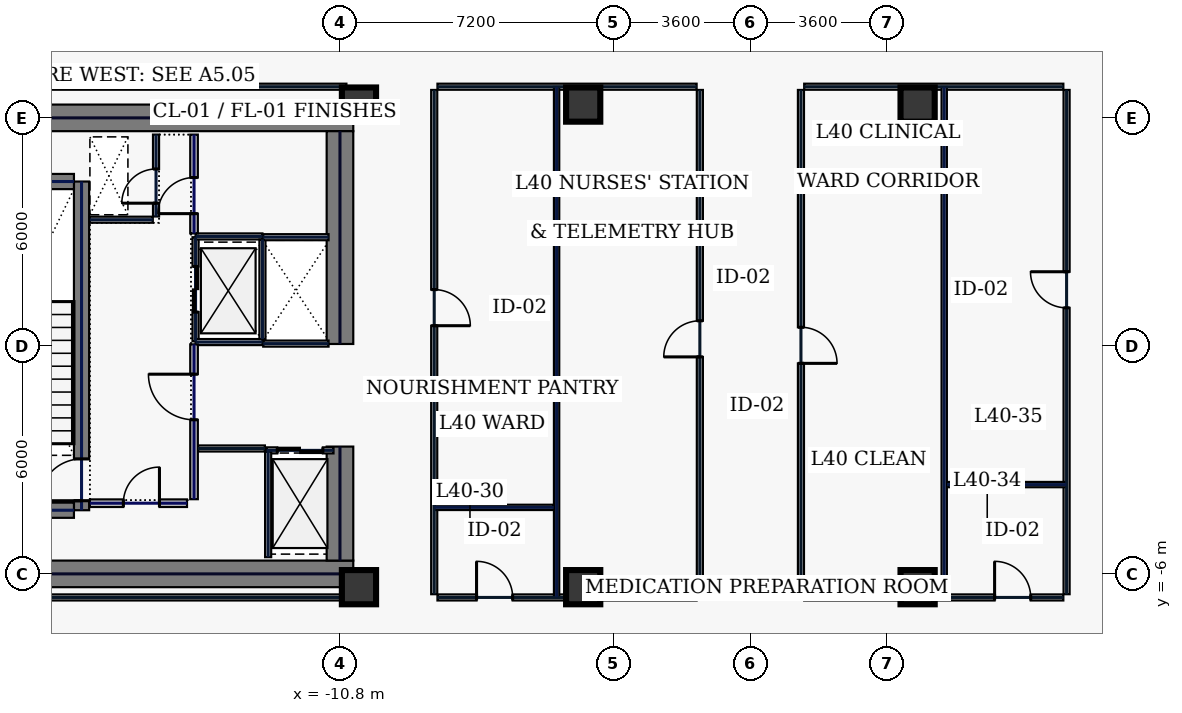
"""IFC4 building model, lengths in metres.
Left out: names, types, materials, properties, quantities, classifications, styles, units other than length and angle.
Written with IfcOpenShell. Run it as: python <this file> out.ifc"""

import sys

from ifc_helpers import new_model, si_unit, direction, frame, frame_2d, origin, origin_2d, place, context, subcontext, project, spatial, rectangle, hollow_rectangle, extrude, element, fill, save


model = new_model("IFC4")
c1 = context("Model", 3, precision=1e-05, world=origin(), true_north=direction((0.0, 1.0)))
c2 = subcontext(c1, "Body", "Model", "MODEL_VIEW")
j1 = project(units=[si_unit("LENGTHUNIT", "METRE"), si_unit("PLANEANGLEUNIT", "RADIAN")], contexts=[c1])
p1 = place(None, origin())
s1 = spatial("IfcSite", under=j1, at=p1, CompositionType="ELEMENT")
p2 = place(p1, origin())
s2 = spatial("IfcBuilding", under=s1, at=p2, CompositionType="ELEMENT")
p3 = place(p2, frame((0.0, 0.0, 176.2)))
s3 = spatial("IfcBuildingStorey", under=s2, at=p3, CompositionType="ELEMENT", Elevation=176.2)
for number, where, z_axis, x_axis in (
    (1, (-22.0, 6.0, 0.0), (0.0, 0.0, 1.0), (1.0, 0.0, 0.0)),
    (2, (-22.0, -6.0, 0.0), (0.0, 0.0, 1.0), (1.0, 0.0, 0.0)),
):
    element("IfcWall", number, at=place(p3, frame(where, z_axis=z_axis, x_axis=x_axis)), inside=s3, PredefinedType="SHEAR", context=c2, shape_type="SweptSolid", body=[
        extrude(rectangle(XDim=11.55, YDim=0.7, at=frame_2d((5.775, 0.0))), origin(), (0.0, 0.0, 1.0), 3.74),
    ])
p4 = place(p3, frame((-10.8, -5.65, 0.0), z_axis=(0.0, 0.0, 1.0), x_axis=(0.0, 1.0, 0.0)))
e3 = element("IfcWall", 3, at=p4, inside=s3, PredefinedType="SHEAR", context=c2, shape_type="SweptSolid", body=[
    extrude(rectangle(XDim=3.0, YDim=0.7, at=frame_2d((1.5, 0.0))), origin(), (0.0, 0.0, 1.0), 3.74),
])
p5 = place(p3, frame((-10.8, 0.05, 0.0), z_axis=(0.0, 0.0, 1.0), x_axis=(0.0, 1.0, 0.0)))
e4 = element("IfcWall", 4, at=p5, inside=s3, PredefinedType="SHEAR", context=c2, shape_type="SweptSolid", body=[
    extrude(rectangle(XDim=5.6, YDim=0.7, at=frame_2d((2.8, 0.0))), origin(), (0.0, 0.0, 1.0), 3.74),
])
p6 = place(p3, frame((-17.6, -4.325, 0.0), z_axis=(0.0, 0.0, 1.0), x_axis=(0.0, 1.0, 0.0)))
e5 = element("IfcWall", 5, at=p6, inside=s3, PredefinedType="SHEAR", context=c2, shape_type="SweptSolid", body=[
    extrude(rectangle(XDim=8.65, YDim=0.4, at=frame_2d((4.325, 0.0))), origin(), (0.0, 0.0, 1.0), 3.74),
])
p7 = place(p6, frame((0.25, 0.0, 0.0)))
e6 = element("IfcOpeningElement", 6, at=p7, cuts=e5, PredefinedType="OPENING", context=c2, shape_type="SweptSolid", body=[
    extrude(rectangle(XDim=1.1, YDim=2.2, at=frame_2d((0.55, 1.1))), frame((0.0, 0.21, 0.0), z_axis=(0.0, -1.0, 0.0), x_axis=(1.0, 0.0, 0.0)), (0.0, 0.0, 1.0), 0.42),
])
for number, where, z_axis, x_axis in (
    (7, (-21.2, -4.325, 0.0), (0.0, 0.0, 1.0), (1.0, 0.0, 0.0)),
    (8, (-21.2, 4.325, 0.0), (0.0, 0.0, 1.0), (1.0, 0.0, 0.0)),
):
    element("IfcWall", number, at=place(p3, frame(where, z_axis=z_axis, x_axis=x_axis)), inside=s3, PredefinedType="SHEAR", context=c2, shape_type="SweptSolid", body=[
        extrude(rectangle(XDim=3.4, YDim=0.4, at=frame_2d((1.7, 0.0))), origin(), (0.0, 0.0, 1.0), 3.74),
    ])
for number, where, z_axis, x_axis in (
    (9, (-10.3, -6.35, 0.0), (0.0, 0.0, 1.0), (1.0, 0.0, 0.0)),
    (10, (-10.3, 6.35, 0.0), (0.0, 0.0, 1.0), (1.0, 0.0, 0.0)),
    (11, (-4.4, -6.35, 0.0), (0.0, 0.0, 1.0), (1.0, 0.0, 0.0)),
    (12, (4.4, -6.35, 0.0), (0.0, 0.0, 1.0), (1.0, 0.0, 0.0)),
    (13, (-4.4, 6.35, 0.0), (0.0, 0.0, 1.0), (1.0, 0.0, 0.0)),
    (14, (4.4, 6.35, 0.0), (0.0, 0.0, 1.0), (1.0, 0.0, 0.0)),
):
    element("IfcColumn", number, at=place(p3, frame(where, z_axis=z_axis, x_axis=x_axis)), inside=s3, PredefinedType="COLUMN", context=c2, shape_type="SweptSolid", body=[
        extrude(hollow_rectangle(XDim=0.9, YDim=0.9, WallThickness=0.04, at=origin_2d()), origin(), (0.0, 0.0, 1.0), 3.74),
    ])
p8 = place(p3, frame((-14.6, 0.12, 0.0), z_axis=(0.0, 0.0, 1.0), x_axis=(0.0, 1.0, 0.0)))
e15 = element("IfcWall", 15, at=p8, inside=s3, PredefinedType="PARTITIONING", context=c2, shape_type="SweptSolid", body=[
    extrude(rectangle(XDim=2.74, YDim=0.16, at=frame_2d((1.37, 0.0))), origin(), (0.0, 0.0, 1.0), 3.74),
])
p9 = place(p8, frame((0.77, 0.0, 0.0)))
e16 = element("IfcOpeningElement", 16, at=p9, cuts=e15, PredefinedType="OPENING", context=c2, shape_type="SweptSolid", body=[
    extrude(rectangle(XDim=1.2, YDim=2.2, at=frame_2d((0.6, 1.1))), frame((0.0, 0.09, 0.0), z_axis=(0.0, -1.0, 0.0), x_axis=(1.0, 0.0, 0.0)), (0.0, 0.0, 1.0), 0.18),
])
for number, where, z_axis, x_axis in (
    (17, (-14.6, 0.1, 0.0), (0.0, 0.0, 1.0), (1.0, 0.0, 0.0)),
    (18, (-14.6, 2.88, 0.0), (0.0, 0.0, 1.0), (1.0, 0.0, 0.0)),
):
    element("IfcWall", number, at=place(p3, frame(where, z_axis=z_axis, x_axis=x_axis)), inside=s3, PredefinedType="PARTITIONING", context=c2, shape_type="SweptSolid", body=[
        extrude(rectangle(XDim=1.76, YDim=0.16, at=frame_2d((0.88, 0.0))), origin(), (0.0, 0.0, 1.0), 3.74),
    ])
p10 = place(p3, frame((-12.84, 0.18, 0.0), z_axis=(0.0, 0.0, 1.0), x_axis=(0.0, 1.0, 0.0)))
e19 = element("IfcWall", 19, at=p10, inside=s3, PredefinedType="PARTITIONING", context=c2, shape_type="SweptSolid", body=[
    extrude(rectangle(XDim=2.62, YDim=0.16, at=frame_2d((1.31, 0.0))), origin(), (0.0, 0.0, 1.0), 3.74),
])
p11 = place(p3, frame((-12.73, -2.75, 0.0), z_axis=(0.0, 0.0, 1.0), x_axis=(1.0, 0.0, 0.0)))
e20 = element("IfcWall", 20, at=p11, inside=s3, PredefinedType="PARTITIONING", context=c2, shape_type="SweptSolid", body=[
    extrude(rectangle(XDim=1.76, YDim=0.16, at=frame_2d((0.88, 0.0))), origin(), (0.0, 0.0, 1.0), 3.74),
])
p12 = place(p11, frame((0.28, 0.0, 0.0)))
e21 = element("IfcOpeningElement", 21, at=p12, cuts=e20, PredefinedType="OPENING", context=c2, shape_type="SweptSolid", body=[
    extrude(rectangle(XDim=1.2, YDim=2.2, at=frame_2d((0.6, 1.1))), frame((0.0, 0.09, 0.0), z_axis=(0.0, -1.0, 0.0), x_axis=(1.0, 0.0, 0.0)), (0.0, 0.0, 1.0), 0.18),
])
for number, where, z_axis, x_axis in (
    (22, (-12.82, 0.06, 0.0), (0.0, 0.0, 1.0), (1.0, 0.0, 0.0)),
    (23, (-12.82, 2.86, 0.0), (0.0, 0.0, 1.0), (1.0, 0.0, 0.0)),
):
    element("IfcWall", number, at=place(p3, frame(where, z_axis=z_axis, x_axis=x_axis)), inside=s3, PredefinedType="PARTITIONING", context=c2, shape_type="SweptSolid", body=[
        extrude(rectangle(XDim=1.72, YDim=0.16, at=frame_2d((0.86, 0.0))), origin(), (0.0, 0.0, 1.0), 3.74),
    ])
p13 = place(p3, frame((-15.64, 3.405, 0.0), z_axis=(0.0, 0.0, 1.0), x_axis=(0.0, 1.0, 0.0)))
e24 = element("IfcWall", 24, at=p13, inside=s3, PredefinedType="PARTITIONING", context=c2, shape_type="SweptSolid", body=[
    extrude(rectangle(XDim=2.155, YDim=0.16, at=frame_2d((1.078, 0.0))), origin(), (0.0, 0.0, 1.0), 3.74),
])
p14 = place(p13, frame((0.35, 0.0, 0.0)))
e25 = element("IfcOpeningElement", 25, at=p14, cuts=e24, PredefinedType="OPENING", context=c2, shape_type="SweptSolid", body=[
    extrude(rectangle(XDim=0.9, YDim=2.2, at=frame_2d((0.45, 1.1))), frame((0.0, 0.09, 0.0), z_axis=(0.0, -1.0, 0.0), x_axis=(1.0, 0.0, 0.0)), (0.0, 0.0, 1.0), 0.18),
])
p15 = place(p3, frame((-17.38, 3.32, 0.0), z_axis=(0.0, 0.0, 1.0), x_axis=(1.0, 0.0, 0.0)))
e26 = element("IfcWall", 26, at=p15, inside=s3, PredefinedType="PARTITIONING", context=c2, shape_type="SweptSolid", body=[
    extrude(rectangle(XDim=1.655, YDim=0.16, at=frame_2d((0.827, 0.0))), origin(), (0.0, 0.0, 1.0), 3.74),
])
p16 = place(p3, frame((-17.38, -4.14, 0.0), z_axis=(0.0, 0.0, 1.0), x_axis=(1.0, 0.0, 0.0)))
e27 = element("IfcWall", 27, at=p16, inside=s3, PredefinedType="SOLIDWALL", context=c2, shape_type="SweptSolid", body=[
    extrude(rectangle(XDim=2.555, YDim=0.2, at=frame_2d((1.277, 0.0))), origin(), (0.0, 0.0, 1.0), 3.74),
])
p17 = place(p16, frame((0.88, 0.0, 0.0)))
e28 = element("IfcOpeningElement", 28, at=p17, cuts=e27, PredefinedType="OPENING", context=c2, shape_type="SweptSolid", body=[
    extrude(rectangle(XDim=0.95, YDim=2.2, at=frame_2d((0.475, 1.1))), frame((0.0, 0.11, 0.0), z_axis=(0.0, -1.0, 0.0), x_axis=(1.0, 0.0, 0.0)), (0.0, 0.0, 1.0), 0.22),
])
p18 = place(p3, frame((-14.535, -2.7, 0.0), z_axis=(0.0, 0.0, 1.0), x_axis=(1.0, 0.0, 0.0)))
e29 = element("IfcWall", 29, at=p18, inside=s3, PredefinedType="PARTITIONING", context=c2, shape_type="SweptSolid", body=[
    extrude(rectangle(XDim=1.76, YDim=0.16, at=frame_2d((0.88, 0.0))), origin(), (0.0, 0.0, 1.0), 3.74),
])
p19 = place(p3, frame((-12.69, -5.56, 0.0), z_axis=(0.0, 0.0, 1.0), x_axis=(0.0, 1.0, 0.0)))
e30 = element("IfcWall", 30, at=p19, inside=s3, PredefinedType="PARTITIONING", context=c2, shape_type="SweptSolid", body=[
    extrude(rectangle(XDim=2.775, YDim=0.16, at=frame_2d((1.388, 0.0))), origin(), (0.0, 0.0, 1.0), 3.74),
])
p20 = place(p3, frame((-14.64, 2.96, 0.0), z_axis=(0.0, 0.0, 1.0), x_axis=(0.0, 1.0, 0.0)))
e31 = element("IfcWall", 31, at=p20, inside=s3, PredefinedType="SOLIDWALL", context=c2, shape_type="SweptSolid", body=[
    extrude(rectangle(XDim=2.6, YDim=0.2, at=frame_2d((1.3, 0.0))), origin(), (0.0, 0.0, 1.0), 3.74),
])
p21 = place(p20, frame((0.52, 0.0, 0.0)))
e32 = element("IfcOpeningElement", 32, at=p21, cuts=e31, PredefinedType="OPENING", context=c2, shape_type="SweptSolid", body=[
    extrude(rectangle(XDim=0.95, YDim=2.2, at=frame_2d((0.475, 1.1))), frame((0.0, 0.11, 0.0), z_axis=(0.0, -1.0, 0.0), x_axis=(1.0, 0.0, 0.0)), (0.0, 0.0, 1.0), 0.22),
])
p22 = place(p3, frame((-14.64, -4.035, 0.0), z_axis=(0.0, 0.0, 1.0), x_axis=(0.0, 1.0, 0.0)))
e33 = element("IfcWall", 33, at=p22, inside=s3, PredefinedType="SOLIDWALL", context=c2, shape_type="SweptSolid", body=[
    extrude(rectangle(XDim=4.075, YDim=0.2, at=frame_2d((2.038, 0.0))), origin(), (0.0, 0.0, 1.0), 3.74),
])
p23 = place(p22, frame((2.09, 0.0, 0.0)))
e34 = element("IfcOpeningElement", 34, at=p23, cuts=e33, PredefinedType="OPENING", context=c2, shape_type="SweptSolid", body=[
    extrude(rectangle(XDim=1.2, YDim=2.2, at=frame_2d((0.6, 1.1))), frame((0.0, 0.11, 0.0), z_axis=(0.0, -1.0, 0.0), x_axis=(1.0, 0.0, 0.0)), (0.0, 0.0, 1.0), 0.22),
])
for number, where, z_axis, x_axis in (
    (35, (-24.965, -6.62, 0.0), (0.0, 0.0, 1.0), (1.0, 0.0, 0.0)),
    (36, (-10.63, 6.82, 0.0), (0.0, 0.0, 1.0), (-1.0, 0.0, 0.0)),
):
    element("IfcWall", number, at=place(p3, frame(where, z_axis=z_axis, x_axis=x_axis)), inside=s3, PredefinedType="PARTITIONING", context=c2, shape_type="SweptSolid", body=[
        extrude(rectangle(XDim=14.335, YDim=0.16, at=frame_2d((7.167, 0.0))), origin(), (0.0, 0.0, 1.0), 3.74),
    ])
p24 = place(p3, frame((8.235, 6.82, 0.0), z_axis=(0.0, 0.0, 1.0), x_axis=(-1.0, 0.0, 0.0)))
e37 = element("IfcWall", 37, at=p24, inside=s3, PredefinedType="PARTITIONING", context=c2, shape_type="SweptSolid", body=[
    extrude(rectangle(XDim=6.82, YDim=0.16, at=frame_2d((3.41, 0.0))), origin(), (0.0, 0.0, 1.0), 3.74),
])
p25 = place(p3, frame((1.33, 6.735, 0.0), z_axis=(0.0, 0.0, 1.0), x_axis=(0.0, -1.0, 0.0)))
e38 = element("IfcWall", 38, at=p25, inside=s3, PredefinedType="PARTITIONING", context=c2, shape_type="SweptSolid", body=[
    extrude(rectangle(XDim=13.27, YDim=0.16, at=frame_2d((6.635, 0.0))), origin(), (0.0, 0.0, 1.0), 3.74),
])
p26 = place(p25, frame((6.245, 0.0, 0.0)))
e39 = element("IfcOpeningElement", 39, at=p26, cuts=e38, PredefinedType="OPENING", context=c2, shape_type="SweptSolid", body=[
    extrude(rectangle(XDim=0.95, YDim=2.2, at=frame_2d((0.475, 1.1))), frame((0.0, 0.09, 0.0), z_axis=(0.0, -1.0, 0.0), x_axis=(1.0, 0.0, 0.0)), (0.0, 0.0, 1.0), 0.18),
])
p27 = place(p3, frame((1.415, -6.62, 0.0), z_axis=(0.0, 0.0, 1.0), x_axis=(1.0, 0.0, 0.0)))
e40 = element("IfcWall", 40, at=p27, inside=s3, PredefinedType="PARTITIONING", context=c2, shape_type="SweptSolid", body=[
    extrude(rectangle(XDim=6.82, YDim=0.16, at=frame_2d((3.41, 0.0))), origin(), (0.0, 0.0, 1.0), 3.74),
])
p28 = place(p27, frame((5.011, 0.0, 0.0)))
e41 = element("IfcOpeningElement", 41, at=p28, cuts=e40, PredefinedType="OPENING", context=c2, shape_type="SweptSolid", body=[
    extrude(rectangle(XDim=0.95, YDim=2.2, at=frame_2d((0.475, 1.1))), frame((0.0, 0.09, 0.0), z_axis=(0.0, -1.0, 0.0), x_axis=(1.0, 0.0, 0.0)), (0.0, 0.0, 1.0), 0.18),
])
p29 = place(p3, frame((8.32, -6.535, 0.0), z_axis=(0.0, 0.0, 1.0), x_axis=(0.0, 1.0, 0.0)))
e42 = element("IfcWall", 42, at=p29, inside=s3, PredefinedType="PARTITIONING", context=c2, shape_type="SweptSolid", body=[
    extrude(rectangle(XDim=13.27, YDim=0.16, at=frame_2d((6.635, 0.0))), origin(), (0.0, 0.0, 1.0), 3.74),
])
p30 = place(p29, frame((7.536, 0.0, 0.0)))
e43 = element("IfcOpeningElement", 43, at=p30, cuts=e42, PredefinedType="OPENING", context=c2, shape_type="SweptSolid", body=[
    extrude(rectangle(XDim=0.95, YDim=2.2, at=frame_2d((0.475, 1.1))), frame((0.0, 0.09, 0.0), z_axis=(0.0, -1.0, 0.0), x_axis=(1.0, 0.0, 0.0)), (0.0, 0.0, 1.0), 0.18),
])
p31 = place(p3, frame((-1.33, -6.535, 0.0), z_axis=(0.0, 0.0, 1.0), x_axis=(0.0, 1.0, 0.0)))
e44 = element("IfcWall", 44, at=p31, inside=s3, PredefinedType="PARTITIONING", context=c2, shape_type="SweptSolid", body=[
    extrude(rectangle(XDim=13.27, YDim=0.16, at=frame_2d((6.635, 0.0))), origin(), (0.0, 0.0, 1.0), 3.74),
])
p32 = place(p31, frame((6.245, 0.0, 0.0)))
e45 = element("IfcOpeningElement", 45, at=p32, cuts=e44, PredefinedType="OPENING", context=c2, shape_type="SweptSolid", body=[
    extrude(rectangle(XDim=0.95, YDim=2.2, at=frame_2d((0.475, 1.1))), frame((0.0, 0.09, 0.0), z_axis=(0.0, -1.0, 0.0), x_axis=(1.0, 0.0, 0.0)), (0.0, 0.0, 1.0), 0.18),
])
p33 = place(p3, frame((-1.415, 6.82, 0.0), z_axis=(0.0, 0.0, 1.0), x_axis=(-1.0, 0.0, 0.0)))
e46 = element("IfcWall", 46, at=p33, inside=s3, PredefinedType="PARTITIONING", context=c2, shape_type="SweptSolid", body=[
    extrude(rectangle(XDim=6.82, YDim=0.16, at=frame_2d((3.41, 0.0))), origin(), (0.0, 0.0, 1.0), 3.74),
])
p34 = place(p3, frame((-8.32, 6.735, 0.0), z_axis=(0.0, 0.0, 1.0), x_axis=(0.0, -1.0, 0.0)))
e47 = element("IfcWall", 47, at=p34, inside=s3, PredefinedType="PARTITIONING", context=c2, shape_type="SweptSolid", body=[
    extrude(rectangle(XDim=13.27, YDim=0.16, at=frame_2d((6.635, 0.0))), origin(), (0.0, 0.0, 1.0), 3.74),
])
p35 = place(p34, frame((5.254, 0.0, 0.0)))
e48 = element("IfcOpeningElement", 48, at=p35, cuts=e47, PredefinedType="OPENING", context=c2, shape_type="SweptSolid", body=[
    extrude(rectangle(XDim=0.95, YDim=2.2, at=frame_2d((0.475, 1.1))), frame((0.0, 0.09, 0.0), z_axis=(0.0, -1.0, 0.0), x_axis=(1.0, 0.0, 0.0)), (0.0, 0.0, 1.0), 0.18),
])
p36 = place(p3, frame((-8.235, -6.62, 0.0), z_axis=(0.0, 0.0, 1.0), x_axis=(1.0, 0.0, 0.0)))
e49 = element("IfcWall", 49, at=p36, inside=s3, PredefinedType="PARTITIONING", context=c2, shape_type="SweptSolid", body=[
    extrude(rectangle(XDim=6.82, YDim=0.16, at=frame_2d((3.41, 0.0))), origin(), (0.0, 0.0, 1.0), 3.74),
])
p37 = place(p36, frame((1.029, 0.0, 0.0)))
e50 = element("IfcOpeningElement", 50, at=p37, cuts=e49, PredefinedType="OPENING", context=c2, shape_type="SweptSolid", body=[
    extrude(rectangle(XDim=0.95, YDim=2.2, at=frame_2d((0.475, 1.1))), frame((0.0, 0.09, 0.0), z_axis=(0.0, -1.0, 0.0), x_axis=(1.0, 0.0, 0.0)), (0.0, 0.0, 1.0), 0.18),
])
for number, where, z_axis, x_axis in (
    (51, (-5.1, -6.615, 0.0), (0.0, 0.0, 1.0), (0.0, 1.0, 0.0)),
    (52, (5.1, -6.615, 0.0), (0.0, 0.0, 1.0), (0.0, 1.0, 0.0)),
):
    element("IfcWall", number, at=place(p3, frame(where, z_axis=z_axis, x_axis=x_axis)), inside=s3, PredefinedType="PARTITIONING", context=c2, shape_type="SweptSolid", body=[
        extrude(rectangle(XDim=13.43, YDim=0.14, at=frame_2d((6.715, 0.0))), origin(), (0.0, 0.0, 1.0), 3.74),
    ])
for number, where, z_axis, x_axis in (
    (53, (-8.315, -4.25, 0.0), (0.0, 0.0, 1.0), (1.0, 0.0, 0.0)),
    (54, (5.175, -3.65, 0.0), (0.0, 0.0, 1.0), (1.0, 0.0, 0.0)),
):
    element("IfcWall", number, at=place(p3, frame(where, z_axis=z_axis, x_axis=x_axis)), inside=s3, PredefinedType="PARTITIONING", context=c2, shape_type="SweptSolid", body=[
        extrude(rectangle(XDim=3.14, YDim=0.14, at=frame_2d((1.57, 0.0))), origin(), (0.0, 0.0, 1.0), 3.74),
    ])
p38 = place(p7, origin())
e55 = element("IfcDoor", 55, at=p38, inside=s3, OperationType="SINGLE_SWING_LEFT", PredefinedType="DOOR", context=c2, shape_type="SweptSolid", body=[
    extrude(rectangle(XDim=1.1, YDim=2.2, at=frame_2d((0.55, 1.1))), frame((0.0, 0.025, 0.0), z_axis=(0.0, -1.0, 0.0), x_axis=(1.0, 0.0, 0.0)), (0.0, 0.0, 1.0), 0.05),
])
fill(e6, e55)
p39 = place(p9, origin())
e56 = element("IfcDoor", 56, at=p39, inside=s3, OperationType="SLIDING_TO_LEFT", PredefinedType="DOOR", context=c2, shape_type="SweptSolid", body=[
    extrude(rectangle(XDim=1.2, YDim=2.2, at=frame_2d((0.6, 1.1))), frame((0.0, 0.025, 0.0), z_axis=(0.0, -1.0, 0.0), x_axis=(1.0, 0.0, 0.0)), (0.0, 0.0, 1.0), 0.05),
])
fill(e16, e56)
p40 = place(p12, origin())
e57 = element("IfcDoor", 57, at=p40, inside=s3, OperationType="SLIDING_TO_LEFT", PredefinedType="DOOR", context=c2, shape_type="SweptSolid", body=[
    extrude(rectangle(XDim=1.2, YDim=2.2, at=frame_2d((0.6, 1.1))), frame((0.0, 0.025, 0.0), z_axis=(0.0, -1.0, 0.0), x_axis=(1.0, 0.0, 0.0)), (0.0, 0.0, 1.0), 0.05),
])
fill(e21, e57)
p41 = place(p14, origin())
e58 = element("IfcDoor", 58, at=p41, inside=s3, OperationType="SINGLE_SWING_LEFT", PredefinedType="DOOR", context=c2, shape_type="SweptSolid", body=[
    extrude(rectangle(XDim=0.9, YDim=2.2, at=frame_2d((0.45, 1.1))), frame((0.0, 0.025, 0.0), z_axis=(0.0, -1.0, 0.0), x_axis=(1.0, 0.0, 0.0)), (0.0, 0.0, 1.0), 0.05),
])
fill(e25, e58)
p42 = place(p17, origin())
e59 = element("IfcDoor", 59, at=p42, inside=s3, OperationType="SINGLE_SWING_RIGHT", PredefinedType="DOOR", context=c2, shape_type="SweptSolid", body=[
    extrude(rectangle(XDim=0.95, YDim=2.2, at=frame_2d((0.475, 1.1))), frame((0.0, 0.025, 0.0), z_axis=(0.0, -1.0, 0.0), x_axis=(1.0, 0.0, 0.0)), (0.0, 0.0, 1.0), 0.05),
])
fill(e28, e59)
p43 = place(p21, origin())
e60 = element("IfcDoor", 60, at=p43, inside=s3, OperationType="SINGLE_SWING_LEFT", PredefinedType="DOOR", context=c2, shape_type="SweptSolid", body=[
    extrude(rectangle(XDim=0.95, YDim=2.2, at=frame_2d((0.475, 1.1))), frame((0.0, 0.025, 0.0), z_axis=(0.0, -1.0, 0.0), x_axis=(1.0, 0.0, 0.0)), (0.0, 0.0, 1.0), 0.05),
])
fill(e32, e60)
p44 = place(p23, origin())
e61 = element("IfcDoor", 61, at=p44, inside=s3, OperationType="SINGLE_SWING_RIGHT", PredefinedType="DOOR", context=c2, shape_type="SweptSolid", body=[
    extrude(rectangle(XDim=1.2, YDim=2.2, at=frame_2d((0.6, 1.1))), frame((0.0, 0.025, 0.0), z_axis=(0.0, -1.0, 0.0), x_axis=(1.0, 0.0, 0.0)), (0.0, 0.0, 1.0), 0.05),
])
fill(e34, e61)
p45 = place(p37, origin())
e62 = element("IfcDoor", 62, at=p45, inside=s3, OperationType="SINGLE_SWING_LEFT", PredefinedType="DOOR", context=c2, shape_type="SweptSolid", body=[
    extrude(rectangle(XDim=0.95, YDim=2.2, at=frame_2d((0.475, 1.1))), frame((0.0, 0.025, 0.0), z_axis=(0.0, -1.0, 0.0), x_axis=(1.0, 0.0, 0.0)), (0.0, 0.0, 1.0), 0.05),
])
fill(e50, e62)
p46 = place(p35, origin())
e63 = element("IfcDoor", 63, at=p46, inside=s3, OperationType="SINGLE_SWING_RIGHT", PredefinedType="DOOR", context=c2, shape_type="SweptSolid", body=[
    extrude(rectangle(XDim=0.95, YDim=2.2, at=frame_2d((0.475, 1.1))), frame((0.0, 0.025, 0.0), z_axis=(0.0, -1.0, 0.0), x_axis=(1.0, 0.0, 0.0)), (0.0, 0.0, 1.0), 0.05),
])
fill(e48, e63)
p47 = place(p32, origin())
e64 = element("IfcDoor", 64, at=p47, inside=s3, OperationType="SINGLE_SWING_LEFT", PredefinedType="DOOR", context=c2, shape_type="SweptSolid", body=[
    extrude(rectangle(XDim=0.95, YDim=2.2, at=frame_2d((0.475, 1.1))), frame((0.0, 0.025, 0.0), z_axis=(0.0, -1.0, 0.0), x_axis=(1.0, 0.0, 0.0)), (0.0, 0.0, 1.0), 0.05),
])
fill(e45, e64)
p48 = place(p26, origin())
e65 = element("IfcDoor", 65, at=p48, inside=s3, OperationType="SINGLE_SWING_RIGHT", PredefinedType="DOOR", context=c2, shape_type="SweptSolid", body=[
    extrude(rectangle(XDim=0.95, YDim=2.2, at=frame_2d((0.475, 1.1))), frame((0.0, 0.025, 0.0), z_axis=(0.0, -1.0, 0.0), x_axis=(1.0, 0.0, 0.0)), (0.0, 0.0, 1.0), 0.05),
])
fill(e39, e65)
p49 = place(p28, origin())
e66 = element("IfcDoor", 66, at=p49, inside=s3, OperationType="SINGLE_SWING_LEFT", PredefinedType="DOOR", context=c2, shape_type="SweptSolid", body=[
    extrude(rectangle(XDim=0.95, YDim=2.2, at=frame_2d((0.475, 1.1))), frame((0.0, 0.025, 0.0), z_axis=(0.0, -1.0, 0.0), x_axis=(1.0, 0.0, 0.0)), (0.0, 0.0, 1.0), 0.05),
])
fill(e41, e66)
p50 = place(p30, origin())
e67 = element("IfcDoor", 67, at=p50, inside=s3, OperationType="SINGLE_SWING_RIGHT", PredefinedType="DOOR", context=c2, shape_type="SweptSolid", body=[
    extrude(rectangle(XDim=0.95, YDim=2.2, at=frame_2d((0.475, 1.1))), frame((0.0, 0.025, 0.0), z_axis=(0.0, -1.0, 0.0), x_axis=(1.0, 0.0, 0.0)), (0.0, 0.0, 1.0), 0.05),
])
fill(e43, e67)
save(model, sys.argv[1])
